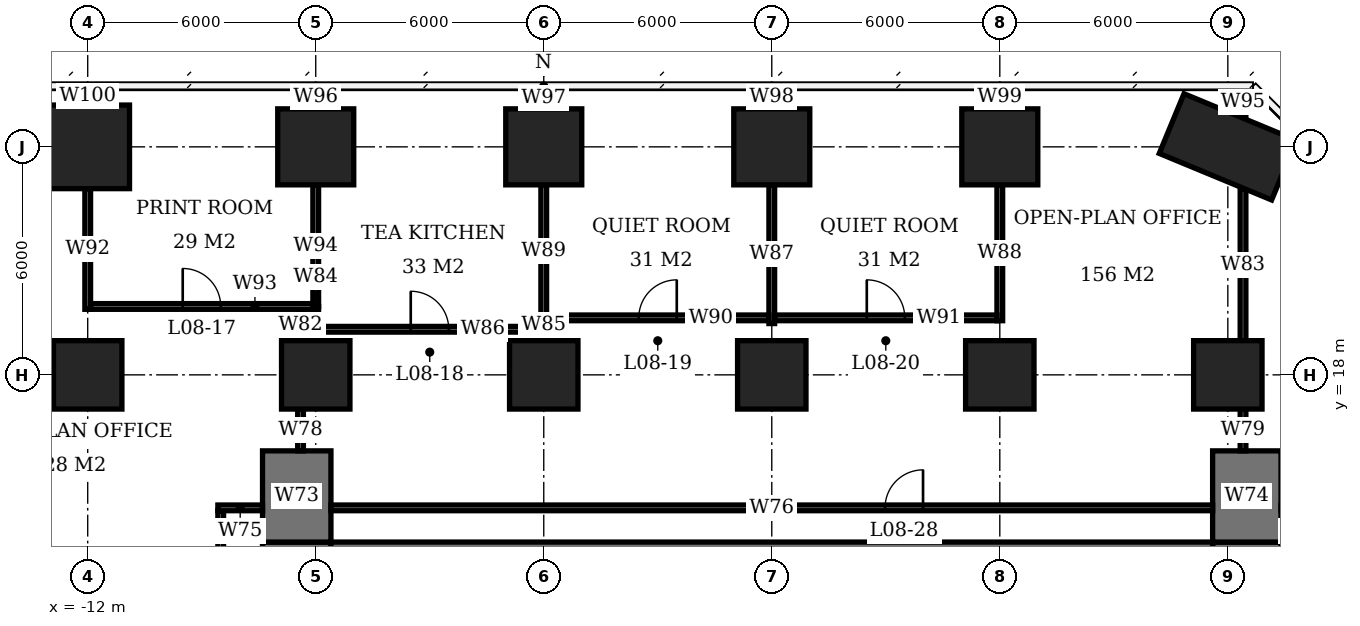
"""IFC4 building model, lengths in metres.
Left out: names, types, materials, properties, quantities, classifications, styles, units other than length and angle.
Written with IfcOpenShell. Run it as: python <this file> out.ifc"""

import sys

from ifc_helpers import new_model, si_unit, direction, frame, frame_2d, origin, origin_2d, place, context, subcontext, project, spatial, rectangle, extrude, element, fill, save


model = new_model("IFC4")
c1 = context("Model", 3, precision=1e-05, world=origin(), true_north=direction((0.0, 1.0)))
c2 = subcontext(c1, "Body", "Model", "MODEL_VIEW")
j1 = project(units=[si_unit("LENGTHUNIT", "METRE"), si_unit("PLANEANGLEUNIT", "RADIAN")], contexts=[c1])
p1 = place(None, origin())
s1 = spatial("IfcSite", under=j1, at=p1, CompositionType="ELEMENT")
p2 = place(p1, origin())
s2 = spatial("IfcBuilding", under=s1, at=p2, CompositionType="ELEMENT")
p3 = place(p2, frame((0.0, 0.0, 37.7)))
s3 = spatial("IfcBuildingStorey", under=s2, at=p3, CompositionType="ELEMENT", Elevation=37.7)
p4 = place(p3, frame((-12.0, 18.0, 0.0), z_axis=(0.0, 0.0, 1.0), x_axis=(1.0, 0.0, 0.0)))
e1 = element("IfcColumn", 1, at=p4, inside=s3, PredefinedType="COLUMN", context=c2, shape_type="SweptSolid", body=[
    extrude(rectangle(XDim=1.8, YDim=1.8, at=origin_2d()), origin(), (0.0, 0.0, 1.0), 3.9),
])
p5 = place(p3, frame((-12.0, 24.0, 0.0), z_axis=(0.0, 0.0, 1.0), x_axis=(1.0, 0.0, 0.0)))
e2 = element("IfcColumn", 2, at=p5, inside=s3, PredefinedType="COLUMN", context=c2, shape_type="SweptSolid", body=[
    extrude(rectangle(XDim=2.2, YDim=2.2, at=origin_2d()), origin(), (0.0, 0.0, 1.0), 3.9),
])
p6 = place(p3, frame((-6.0, 18.0, 0.0), z_axis=(0.0, 0.0, 1.0), x_axis=(1.0, 0.0, 0.0)))
e3 = element("IfcColumn", 3, at=p6, inside=s3, PredefinedType="COLUMN", context=c2, shape_type="SweptSolid", body=[
    extrude(rectangle(XDim=1.8, YDim=1.8, at=origin_2d()), origin(), (0.0, 0.0, 1.0), 3.9),
])
p7 = place(p3, frame((-6.0, 24.0, 0.0), z_axis=(0.0, 0.0, 1.0), x_axis=(1.0, 0.0, 0.0)))
e4 = element("IfcColumn", 4, at=p7, inside=s3, PredefinedType="COLUMN", context=c2, shape_type="SweptSolid", body=[
    extrude(rectangle(XDim=2.0, YDim=2.0, at=origin_2d()), origin(), (0.0, 0.0, 1.0), 3.9),
])
p8 = place(p3, frame((0.0, 18.0, 0.0), z_axis=(0.0, 0.0, 1.0), x_axis=(1.0, 0.0, 0.0)))
e5 = element("IfcColumn", 5, at=p8, inside=s3, PredefinedType="COLUMN", context=c2, shape_type="SweptSolid", body=[
    extrude(rectangle(XDim=1.8, YDim=1.8, at=origin_2d()), origin(), (0.0, 0.0, 1.0), 3.9),
])
p9 = place(p3, frame((0.0, 24.0, 0.0), z_axis=(0.0, 0.0, 1.0), x_axis=(1.0, 0.0, 0.0)))
e6 = element("IfcColumn", 6, at=p9, inside=s3, PredefinedType="COLUMN", context=c2, shape_type="SweptSolid", body=[
    extrude(rectangle(XDim=2.0, YDim=2.0, at=origin_2d()), origin(), (0.0, 0.0, 1.0), 3.9),
])
p10 = place(p3, frame((6.0, 18.0, 0.0), z_axis=(0.0, 0.0, 1.0), x_axis=(1.0, 0.0, 0.0)))
e7 = element("IfcColumn", 7, at=p10, inside=s3, PredefinedType="COLUMN", context=c2, shape_type="SweptSolid", body=[
    extrude(rectangle(XDim=1.8, YDim=1.8, at=origin_2d()), origin(), (0.0, 0.0, 1.0), 3.9),
])
p11 = place(p3, frame((6.0, 24.0, 0.0), z_axis=(0.0, 0.0, 1.0), x_axis=(1.0, 0.0, 0.0)))
e8 = element("IfcColumn", 8, at=p11, inside=s3, PredefinedType="COLUMN", context=c2, shape_type="SweptSolid", body=[
    extrude(rectangle(XDim=2.0, YDim=2.0, at=origin_2d()), origin(), (0.0, 0.0, 1.0), 3.9),
])
p12 = place(p3, frame((12.0, 18.0, 0.0), z_axis=(0.0, 0.0, 1.0), x_axis=(1.0, 0.0, 0.0)))
e9 = element("IfcColumn", 9, at=p12, inside=s3, PredefinedType="COLUMN", context=c2, shape_type="SweptSolid", body=[
    extrude(rectangle(XDim=1.8, YDim=1.8, at=origin_2d()), origin(), (0.0, 0.0, 1.0), 3.9),
])
p13 = place(p3, frame((12.0, 24.0, 0.0), z_axis=(0.0, 0.0, 1.0), x_axis=(1.0, 0.0, 0.0)))
e10 = element("IfcColumn", 10, at=p13, inside=s3, PredefinedType="COLUMN", context=c2, shape_type="SweptSolid", body=[
    extrude(rectangle(XDim=2.0, YDim=2.0, at=origin_2d()), origin(), (0.0, 0.0, 1.0), 3.9),
])
p14 = place(p3, frame((18.0, 18.0, 0.0), z_axis=(0.0, 0.0, 1.0), x_axis=(1.0, 0.0, 0.0)))
e11 = element("IfcColumn", 11, at=p14, inside=s3, PredefinedType="COLUMN", context=c2, shape_type="SweptSolid", body=[
    extrude(rectangle(XDim=1.8, YDim=1.8, at=origin_2d()), origin(), (0.0, 0.0, 1.0), 3.9),
])
p15 = place(p3, frame((18.0, 24.0, 0.0), z_axis=(0.0, 0.0, 1.0), x_axis=(0.923879532511, -0.382683432365, 0.0)))
e12 = element("IfcColumn", 12, at=p15, inside=s3, PredefinedType="COLUMN", context=c2, shape_type="SweptSolid", body=[
    extrude(rectangle(XDim=3.2, YDim=1.7, at=origin_2d()), origin(), (0.0, 0.0, 1.0), 3.9),
])
p16 = place(p3, frame((-5.6, 12.6, 0.0), z_axis=(0.0, 0.0, 1.0), x_axis=(1.0, 0.0, 0.0)))
e13 = element("IfcWall", 13, at=p16, inside=s3, PredefinedType="SHEAR", context=c2, shape_type="SweptSolid", body=[
    extrude(rectangle(XDim=23.2, YDim=2.0, at=frame_2d((11.6, 0.0))), origin(), (0.0, 0.0, 1.0), 3.9),
])
p17 = place(p3, frame((-6.5, -7.6, 0.0), z_axis=(0.0, 0.0, 1.0), x_axis=(0.0, 1.0, 0.0)))
e14 = element("IfcWall", 14, at=p17, inside=s3, PredefinedType="SHEAR", context=c2, shape_type="SweptSolid", body=[
    extrude(rectangle(XDim=21.2, YDim=1.8, at=frame_2d((10.6, 0.0))), origin(), (0.0, 0.0, 1.0), 3.9),
])
p18 = place(p17, frame((7.8, 0.0, 0.0)))
e15 = element("IfcOpeningElement", 15, at=p18, cuts=e14, PredefinedType="OPENING", context=c2, shape_type="SweptSolid", body=[
    extrude(rectangle(XDim=1.8, YDim=2.4, at=frame_2d((0.9, 1.2))), frame((0.0, 0.91, 0.0), z_axis=(0.0, -1.0, 0.0), x_axis=(1.0, 0.0, 0.0)), (0.0, 0.0, 1.0), 1.82),
])
p19 = place(p3, frame((18.5, -7.6, 0.0), z_axis=(0.0, 0.0, 1.0), x_axis=(0.0, 1.0, 0.0)))
e16 = element("IfcWall", 16, at=p19, inside=s3, PredefinedType="SHEAR", context=c2, shape_type="SweptSolid", body=[
    extrude(rectangle(XDim=21.2, YDim=1.8, at=frame_2d((10.6, 0.0))), origin(), (0.0, 0.0, 1.0), 3.9),
])
p20 = place(p19, frame((9.2, 0.0, 0.0)))
e17 = element("IfcOpeningElement", 17, at=p20, cuts=e16, PredefinedType="OPENING", context=c2, shape_type="SweptSolid", body=[
    extrude(rectangle(XDim=1.8, YDim=2.4, at=frame_2d((0.9, 1.2))), frame((0.0, 0.91, 0.0), z_axis=(0.0, -1.0, 0.0), x_axis=(1.0, 0.0, 0.0)), (0.0, 0.0, 1.0), 1.82),
])
for number, where, z_axis, x_axis in (
    (18, (-6.5, 13.6, 0.0), (0.0, 0.0, 1.0), (0.0, 1.0, 0.0)),
    (19, (18.5, 13.6, 0.0), (0.0, 0.0, 1.0), (0.0, 1.0, 0.0)),
):
    element("IfcWall", number, at=place(p3, frame(where, z_axis=z_axis, x_axis=x_axis)), inside=s3, PredefinedType="SHEAR", context=c2, shape_type="SweptSolid", body=[
        extrude(rectangle(XDim=2.4, YDim=1.8, at=frame_2d((1.2, 0.0))), origin(), (0.0, 0.0, 1.0), 3.9),
    ])
p21 = place(p3, frame((-5.925, 19.2, 0.0), z_axis=(0.0, 0.0, 1.0), x_axis=(1.0, 0.0, 0.0)))
e20 = element("IfcWall", 20, at=p21, inside=s3, PredefinedType="PARTITIONING", context=c2, shape_type="SweptSolid", body=[
    extrude(rectangle(XDim=5.85, YDim=0.15, at=frame_2d((2.925, 0.0))), origin(), (0.0, 0.0, 1.0), 3.65),
])
p22 = place(p21, frame((2.425, 0.0, 0.0)))
e21 = element("IfcOpeningElement", 21, at=p22, cuts=e20, PredefinedType="OPENING", context=c2, shape_type="SweptSolid", body=[
    extrude(rectangle(XDim=1.0, YDim=2.1, at=frame_2d((0.5, 1.05))), frame((0.0, 0.085, 0.0), z_axis=(0.0, -1.0, 0.0), x_axis=(1.0, 0.0, 0.0)), (0.0, 0.0, 1.0), 0.17),
])
p23 = place(p3, frame((0.075, 19.5, 0.0), z_axis=(0.0, 0.0, 1.0), x_axis=(1.0, 0.0, 0.0)))
e22 = element("IfcWall", 22, at=p23, inside=s3, PredefinedType="PARTITIONING", context=c2, shape_type="SweptSolid", body=[
    extrude(rectangle(XDim=5.85, YDim=0.15, at=frame_2d((2.925, 0.0))), origin(), (0.0, 0.0, 1.0), 3.65),
])
p24 = place(p23, frame((2.425, 0.0, 0.0)))
e23 = element("IfcOpeningElement", 23, at=p24, cuts=e22, PredefinedType="OPENING", context=c2, shape_type="SweptSolid", body=[
    extrude(rectangle(XDim=1.0, YDim=2.1, at=frame_2d((0.5, 1.05))), frame((0.0, 0.085, 0.0), z_axis=(0.0, -1.0, 0.0), x_axis=(1.0, 0.0, 0.0)), (0.0, 0.0, 1.0), 0.17),
])
p25 = place(p3, frame((6.075, 19.5, 0.0), z_axis=(0.0, 0.0, 1.0), x_axis=(1.0, 0.0, 0.0)))
e24 = element("IfcWall", 24, at=p25, inside=s3, PredefinedType="PARTITIONING", context=c2, shape_type="SweptSolid", body=[
    extrude(rectangle(XDim=5.85, YDim=0.15, at=frame_2d((2.925, 0.0))), origin(), (0.0, 0.0, 1.0), 3.65),
])
p26 = place(p25, frame((2.425, 0.0, 0.0)))
e25 = element("IfcOpeningElement", 25, at=p26, cuts=e24, PredefinedType="OPENING", context=c2, shape_type="SweptSolid", body=[
    extrude(rectangle(XDim=1.0, YDim=2.1, at=frame_2d((0.5, 1.05))), frame((0.0, 0.085, 0.0), z_axis=(0.0, -1.0, 0.0), x_axis=(1.0, 0.0, 0.0)), (0.0, 0.0, 1.0), 0.17),
])
p27 = place(p3, frame((-11.925, 19.8, 0.0), z_axis=(0.0, 0.0, 1.0), x_axis=(1.0, 0.0, 0.0)))
e26 = element("IfcWall", 26, at=p27, inside=s3, PredefinedType="PARTITIONING", context=c2, shape_type="SweptSolid", body=[
    extrude(rectangle(XDim=5.85, YDim=0.15, at=frame_2d((2.925, 0.0))), origin(), (0.0, 0.0, 1.0), 3.65),
])
p28 = place(p27, frame((2.425, 0.0, 0.0)))
e27 = element("IfcOpeningElement", 27, at=p28, cuts=e26, PredefinedType="OPENING", context=c2, shape_type="SweptSolid", body=[
    extrude(rectangle(XDim=1.0, YDim=2.1, at=frame_2d((0.5, 1.05))), frame((0.0, 0.085, 0.0), z_axis=(0.0, -1.0, 0.0), x_axis=(1.0, 0.0, 0.0)), (0.0, 0.0, 1.0), 0.17),
])
p29 = place(p3, frame((-12.0, 19.725, 0.0), z_axis=(0.0, 0.0, 1.0), x_axis=(0.0, 1.0, 0.0)))
e28 = element("IfcWall", 28, at=p29, inside=s3, PredefinedType="PARTITIONING", context=c2, shape_type="SweptSolid", body=[
    extrude(rectangle(XDim=3.175, YDim=0.15, at=frame_2d((1.587, 0.0))), origin(), (0.0, 0.0, 1.0), 3.65),
])
p30 = place(p3, frame((-12.0, 25.1, 0.0), z_axis=(0.0, 0.0, 1.0), x_axis=(0.0, 1.0, 0.0)))
e29 = element("IfcWall", 29, at=p30, inside=s3, PredefinedType="PARTITIONING", context=c2, shape_type="SweptSolid", body=[
    extrude(rectangle(XDim=0.5, YDim=0.15, at=frame_2d((0.25, 0.0))), origin(), (0.0, 0.0, 1.0), 3.65),
])
p31 = place(p3, frame((-6.0, 19.125, 0.0), z_axis=(0.0, 0.0, 1.0), x_axis=(0.0, 1.0, 0.0)))
e30 = element("IfcWall", 30, at=p31, inside=s3, PredefinedType="PARTITIONING", context=c2, shape_type="SweptSolid", body=[
    extrude(rectangle(XDim=0.675, YDim=0.15, at=frame_2d((0.337, 0.0))), origin(), (0.0, 0.0, 1.0), 3.65),
])
p32 = place(p3, frame((-6.0, 19.8, 0.0), z_axis=(0.0, 0.0, 1.0), x_axis=(0.0, 1.0, 0.0)))
e31 = element("IfcWall", 31, at=p32, inside=s3, PredefinedType="PARTITIONING", context=c2, shape_type="SweptSolid", body=[
    extrude(rectangle(XDim=3.2, YDim=0.15, at=frame_2d((1.6, 0.0))), origin(), (0.0, 0.0, 1.0), 3.65),
])
p33 = place(p3, frame((-6.0, 25.0, 0.0), z_axis=(0.0, 0.0, 1.0), x_axis=(0.0, 1.0, 0.0)))
e32 = element("IfcWall", 32, at=p33, inside=s3, PredefinedType="PARTITIONING", context=c2, shape_type="SweptSolid", body=[
    extrude(rectangle(XDim=0.6, YDim=0.15, at=frame_2d((0.3, 0.0))), origin(), (0.0, 0.0, 1.0), 3.65),
])
p34 = place(p3, frame((0.0, 19.125, 0.0), z_axis=(0.0, 0.0, 1.0), x_axis=(0.0, 1.0, 0.0)))
e33 = element("IfcWall", 33, at=p34, inside=s3, PredefinedType="PARTITIONING", context=c2, shape_type="SweptSolid", body=[
    extrude(rectangle(XDim=0.375, YDim=0.15, at=frame_2d((0.188, 0.0))), origin(), (0.0, 0.0, 1.0), 3.65),
])
p35 = place(p3, frame((0.0, 19.5, 0.0), z_axis=(0.0, 0.0, 1.0), x_axis=(0.0, 1.0, 0.0)))
e34 = element("IfcWall", 34, at=p35, inside=s3, PredefinedType="PARTITIONING", context=c2, shape_type="SweptSolid", body=[
    extrude(rectangle(XDim=3.5, YDim=0.15, at=frame_2d((1.75, 0.0))), origin(), (0.0, 0.0, 1.0), 3.65),
])
p36 = place(p3, frame((0.0, 25.0, 0.0), z_axis=(0.0, 0.0, 1.0), x_axis=(0.0, 1.0, 0.0)))
e35 = element("IfcWall", 35, at=p36, inside=s3, PredefinedType="PARTITIONING", context=c2, shape_type="SweptSolid", body=[
    extrude(rectangle(XDim=0.55, YDim=0.15, at=frame_2d((0.275, 0.0))), origin(), (0.0, 0.0, 1.0), 3.65),
])
p37 = place(p3, frame((6.0, 19.35, 0.0), z_axis=(0.0, 0.0, 1.0), x_axis=(0.0, 1.0, 0.0)))
e36 = element("IfcWall", 36, at=p37, inside=s3, PredefinedType="PARTITIONING", context=c2, shape_type="SweptSolid", body=[
    extrude(rectangle(XDim=3.65, YDim=0.15, at=frame_2d((1.825, 0.0))), origin(), (0.0, 0.0, 1.0), 3.65),
])
p38 = place(p3, frame((6.0, 25.0, 0.0), z_axis=(0.0, 0.0, 1.0), x_axis=(0.0, 1.0, 0.0)))
e37 = element("IfcWall", 37, at=p38, inside=s3, PredefinedType="PARTITIONING", context=c2, shape_type="SweptSolid", body=[
    extrude(rectangle(XDim=0.6, YDim=0.15, at=frame_2d((0.3, 0.0))), origin(), (0.0, 0.0, 1.0), 3.65),
])
p39 = place(p3, frame((12.0, 19.425, 0.0), z_axis=(0.0, 0.0, 1.0), x_axis=(0.0, 1.0, 0.0)))
e38 = element("IfcWall", 38, at=p39, inside=s3, PredefinedType="PARTITIONING", context=c2, shape_type="SweptSolid", body=[
    extrude(rectangle(XDim=3.575, YDim=0.15, at=frame_2d((1.788, 0.0))), origin(), (0.0, 0.0, 1.0), 3.65),
])
p40 = place(p3, frame((12.0, 25.0, 0.0), z_axis=(0.0, 0.0, 1.0), x_axis=(0.0, 1.0, 0.0)))
e39 = element("IfcWall", 39, at=p40, inside=s3, PredefinedType="PARTITIONING", context=c2, shape_type="SweptSolid", body=[
    extrude(rectangle(XDim=0.6, YDim=0.15, at=frame_2d((0.3, 0.0))), origin(), (0.0, 0.0, 1.0), 3.65),
])
p41 = place(p3, frame((-8.5, 7.575, 0.0), z_axis=(0.0, 0.0, 1.0), x_axis=(0.0, 1.0, 0.0)))
e40 = element("IfcWall", 40, at=p41, inside=s3, PredefinedType="PARTITIONING", context=c2, shape_type="SweptSolid", body=[
    extrude(rectangle(XDim=6.85, YDim=0.15, at=frame_2d((3.425, 0.0))), origin(), (0.0, 0.0, 1.0), 3.65),
])
p42 = place(p41, frame((1.875, 0.0, 0.0)))
e41 = element("IfcOpeningElement", 41, at=p42, cuts=e40, PredefinedType="OPENING", context=c2, shape_type="SweptSolid", body=[
    extrude(rectangle(XDim=1.0, YDim=2.1, at=frame_2d((0.5, 1.05))), frame((0.0, 0.085, 0.0), z_axis=(0.0, -1.0, 0.0), x_axis=(1.0, 0.0, 0.0)), (0.0, 0.0, 1.0), 0.17),
])
p43 = place(p3, frame((-8.575, 14.5, 0.0), z_axis=(0.0, 0.0, 1.0), x_axis=(1.0, 0.0, 0.0)))
e42 = element("IfcWall", 42, at=p43, inside=s3, PredefinedType="PARTITIONING", context=c2, shape_type="SweptSolid", body=[
    extrude(rectangle(XDim=1.175, YDim=0.15, at=frame_2d((0.587, 0.0))), origin(), (0.0, 0.0, 1.0), 3.65),
])
p44 = place(p3, frame((-6.4, 16.0, 0.0), z_axis=(0.0, 0.0, 1.0), x_axis=(0.0, 1.0, 0.0)))
e43 = element("IfcWall", 43, at=p44, inside=s3, PredefinedType="PARTITIONING", context=c2, shape_type="SweptSolid", body=[
    extrude(rectangle(XDim=1.1, YDim=0.15, at=frame_2d((0.55, 0.0))), origin(), (0.0, 0.0, 1.0), 3.65),
])
p45 = place(p3, frame((-6.4, 18.9, 0.0), z_axis=(0.0, 0.0, 1.0), x_axis=(0.0, 1.0, 0.0)))
e44 = element("IfcWall", 44, at=p45, inside=s3, PredefinedType="PARTITIONING", context=c2, shape_type="SweptSolid", body=[
    extrude(rectangle(XDim=0.825, YDim=0.15, at=frame_2d((0.413, 0.0))), origin(), (0.0, 0.0, 1.0), 3.65),
])
p46 = place(p3, frame((-5.6, 14.5, 0.0), z_axis=(0.0, 0.0, 1.0), x_axis=(1.0, 0.0, 0.0)))
e45 = element("IfcWall", 45, at=p46, inside=s3, PredefinedType="PARTITIONING", context=c2, shape_type="SweptSolid", body=[
    extrude(rectangle(XDim=23.2, YDim=0.15, at=frame_2d((11.6, 0.0))), origin(), (0.0, 0.0, 1.0), 3.65),
])
p47 = place(p46, frame((14.58, 0.0, 0.0)))
e46 = element("IfcOpeningElement", 46, at=p47, cuts=e45, PredefinedType="OPENING", context=c2, shape_type="SweptSolid", body=[
    extrude(rectangle(XDim=1.0, YDim=2.1, at=frame_2d((0.5, 1.05))), frame((0.0, 0.085, 0.0), z_axis=(0.0, -1.0, 0.0), x_axis=(1.0, 0.0, 0.0)), (0.0, 0.0, 1.0), 0.17),
])
p48 = place(p3, frame((18.4, 16.0, 0.0), z_axis=(0.0, 0.0, 1.0), x_axis=(0.0, 1.0, 0.0)))
e47 = element("IfcWall", 47, at=p48, inside=s3, PredefinedType="PARTITIONING", context=c2, shape_type="SweptSolid", body=[
    extrude(rectangle(XDim=1.1, YDim=0.15, at=frame_2d((0.55, 0.0))), origin(), (0.0, 0.0, 1.0), 3.65),
])
p49 = place(p3, frame((18.4, 18.9, 0.0), z_axis=(0.0, 0.0, 1.0), x_axis=(0.0, 1.0, 0.0)))
e48 = element("IfcWall", 48, at=p49, inside=s3, PredefinedType="PARTITIONING", context=c2, shape_type="SweptSolid", body=[
    extrude(rectangle(XDim=3.983, YDim=0.15, at=frame_2d((1.992, 0.0))), origin(), (0.0, 0.0, 1.0), 3.65),
])
p50 = place(p3, frame((18.4, 24.785, 0.0), z_axis=(0.0, 0.0, 1.0), x_axis=(0.0, 1.0, 0.0)))
e49 = element("IfcWall", 49, at=p50, inside=s3, PredefinedType="PARTITIONING", context=c2, shape_type="SweptSolid", body=[
    extrude(rectangle(XDim=0.815, YDim=0.15, at=frame_2d((0.407, 0.0))), origin(), (0.0, 0.0, 1.0), 3.65),
])
p51 = place(p3, frame((19.4, 14.5, 0.0), z_axis=(0.0, 0.0, 1.0), x_axis=(1.0, 0.0, 0.0)))
e50 = element("IfcWall", 50, at=p51, inside=s3, PredefinedType="PARTITIONING", context=c2, shape_type="SweptSolid", body=[
    extrude(rectangle(XDim=1.175, YDim=0.15, at=frame_2d((0.587, 0.0))), origin(), (0.0, 0.0, 1.0), 3.65),
])
p52 = place(p28, origin())
e51 = element("IfcDoor", 51, at=p52, inside=s3, OperationType="SINGLE_SWING_LEFT", PredefinedType="DOOR", context=c2, shape_type="SweptSolid", body=[
    extrude(rectangle(XDim=1.0, YDim=2.1, at=frame_2d((0.5, 1.05))), frame((0.0, 0.025, 0.0), z_axis=(0.0, -1.0, 0.0), x_axis=(1.0, 0.0, 0.0)), (0.0, 0.0, 1.0), 0.05),
])
fill(e27, e51)
p53 = place(p22, origin())
e52 = element("IfcDoor", 52, at=p53, inside=s3, OperationType="SINGLE_SWING_LEFT", PredefinedType="DOOR", context=c2, shape_type="SweptSolid", body=[
    extrude(rectangle(XDim=1.0, YDim=2.1, at=frame_2d((0.5, 1.05))), frame((0.0, 0.025, 0.0), z_axis=(0.0, -1.0, 0.0), x_axis=(1.0, 0.0, 0.0)), (0.0, 0.0, 1.0), 0.05),
])
fill(e21, e52)
p54 = place(p24, origin())
e53 = element("IfcDoor", 53, at=p54, inside=s3, OperationType="SINGLE_SWING_RIGHT", PredefinedType="DOOR", context=c2, shape_type="SweptSolid", body=[
    extrude(rectangle(XDim=1.0, YDim=2.1, at=frame_2d((0.5, 1.05))), frame((0.0, 0.025, 0.0), z_axis=(0.0, -1.0, 0.0), x_axis=(1.0, 0.0, 0.0)), (0.0, 0.0, 1.0), 0.05),
])
fill(e23, e53)
p55 = place(p26, origin())
e54 = element("IfcDoor", 54, at=p55, inside=s3, OperationType="SINGLE_SWING_LEFT", PredefinedType="DOOR", context=c2, shape_type="SweptSolid", body=[
    extrude(rectangle(XDim=1.0, YDim=2.1, at=frame_2d((0.5, 1.05))), frame((0.0, 0.025, 0.0), z_axis=(0.0, -1.0, 0.0), x_axis=(1.0, 0.0, 0.0)), (0.0, 0.0, 1.0), 0.05),
])
fill(e25, e54)
p56 = place(p47, origin())
e55 = element("IfcDoor", 55, at=p56, inside=s3, OperationType="SINGLE_SWING_RIGHT", PredefinedType="DOOR", context=c2, shape_type="SweptSolid", body=[
    extrude(rectangle(XDim=1.0, YDim=2.1, at=frame_2d((0.5, 1.05))), frame((0.0, 0.025, 0.0), z_axis=(0.0, -1.0, 0.0), x_axis=(1.0, 0.0, 0.0)), (0.0, 0.0, 1.0), 0.05),
])
fill(e46, e55)
save(model, sys.argv[1])
